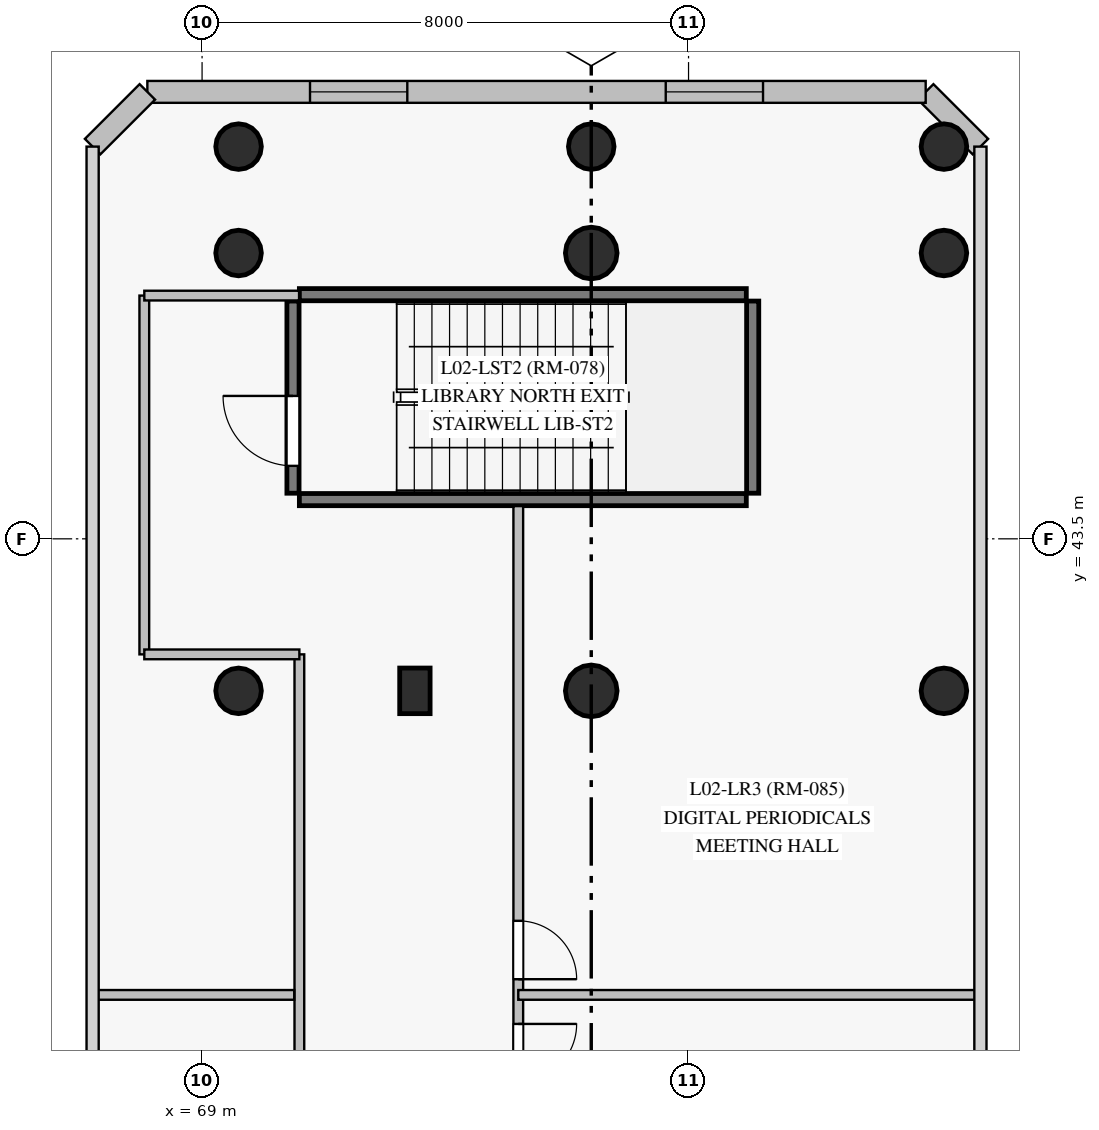
"""IFC4 building model, lengths in metres.
Left out: names, types, materials, properties, quantities, classifications, styles, units other than length and angle.
Written with IfcOpenShell. Run it as: python <this file> out.ifc"""

import sys

from ifc_helpers import new_model, si_unit, direction, frame, frame_2d, origin, origin_with_axes, origin_2d, place, context, subcontext, project, spatial, rectangle, circle, extrude, source, transform, mapped, element, fill, save


model = new_model("IFC4")
c1 = context("Model", 3, precision=1e-05, world=origin(), true_north=direction((0.0, 1.0)))
c2 = subcontext(c1, "Body", "Model", "MODEL_VIEW")
j1 = project(units=[si_unit("LENGTHUNIT", "METRE"), si_unit("PLANEANGLEUNIT", "RADIAN")], contexts=[c1])
p1 = place(None, origin())
s1 = spatial("IfcSite", under=j1, at=p1, CompositionType="ELEMENT")
p2 = place(p1, origin())
s2 = spatial("IfcBuilding", under=s1, at=p2, CompositionType="ELEMENT")
p3 = place(p2, frame((0.0, 0.0, 9.0)))
s3 = spatial("IfcBuildingStorey", under=s2, at=p3, CompositionType="ELEMENT", Elevation=9.0)
m1 = source(origin_with_axes(), c2, "Body", "SweptSolid", [
    extrude(circle(Radius=0.375, at=origin_2d()), origin(), (0.0, 0.0, 1.0), 4.5),
])
for number, where, z_axis, x_axis in (
    (1, (69.6, 49.95, 0.0), (0.0, 0.0, 1.0), (1.0, 0.0, 0.0)),
    (2, (75.4, 49.95, 0.0), (0.0, 0.0, 1.0), (1.0, 0.0, 0.0)),
    (3, (81.2, 49.95, 0.0), (0.0, 0.0, 1.0), (1.0, 0.0, 0.0)),
    (4, (69.6, 41.0, 0.0), (0.0, 0.0, 1.0), (1.0, 0.0, 0.0)),
    (5, (69.6, 48.2, 0.0), (0.0, 0.0, 1.0), (1.0, 0.0, 0.0)),
):
    element("IfcColumn", number, at=place(p3, frame(where, z_axis=z_axis, x_axis=x_axis)), inside=s3, PredefinedType="COLUMN", context=c2, shape_type="MappedRepresentation", body=[
        mapped(m1, transform((0.0, 0.0, 0.0), scale=1.0)),
    ])
m2 = source(origin_with_axes(), c2, "Body", "SweptSolid", [
    extrude(circle(Radius=0.425, at=origin_2d()), origin(), (0.0, 0.0, 1.0), 4.5),
])
for number, where, z_axis, x_axis in (
    (6, (75.4, 41.0, 0.0), (0.0, 0.0, 1.0), (1.0, 0.0, 0.0)),
    (7, (75.4, 48.2, 0.0), (0.0, 0.0, 1.0), (1.0, 0.0, 0.0)),
):
    element("IfcColumn", number, at=place(p3, frame(where, z_axis=z_axis, x_axis=x_axis)), inside=s3, PredefinedType="COLUMN", context=c2, shape_type="MappedRepresentation", body=[
        mapped(m2, transform((0.0, 0.0, 0.0), scale=1.0)),
    ])
for number, where, z_axis, x_axis in (
    (8, (81.2, 41.0, 0.0), (0.0, 0.0, 1.0), (1.0, 0.0, 0.0)),
    (9, (81.2, 48.2, 0.0), (0.0, 0.0, 1.0), (1.0, 0.0, 0.0)),
):
    element("IfcColumn", number, at=place(p3, frame(where, z_axis=z_axis, x_axis=x_axis)), inside=s3, PredefinedType="COLUMN", context=c2, shape_type="MappedRepresentation", body=[
        mapped(m1, transform((0.0, 0.0, 0.0), scale=1.0)),
    ])
m3 = source(origin_with_axes(), c2, "Body", "SweptSolid", [
    extrude(rectangle(XDim=0.5, YDim=0.75, at=origin_2d()), origin(), (0.0, 0.0, 1.0), 4.5),
])
p4 = place(p3, frame((72.5, 41.0, 0.0), z_axis=(0.0, 0.0, 1.0), x_axis=(1.0, 0.0, 0.0)))
e10 = element("IfcColumn", 10, at=p4, inside=s3, PredefinedType="PILASTER", context=c2, shape_type="MappedRepresentation", body=[
    mapped(m3, transform((0.0, 0.0, 0.0), scale=1.0)),
])
p5 = place(p3, frame((81.8, 49.95, 0.0), z_axis=(0.0, 0.0, 1.0), x_axis=(-0.707106781187, 0.707106781187, 0.0)))
e11 = element("IfcWall", 11, at=p5, inside=s3, PredefinedType="SOLIDWALL", context=c2, shape_type="SweptSolid", body=[
    extrude(rectangle(XDim=1.273, YDim=0.36, at=frame_2d((0.636, 0.0))), origin(), (0.0, 0.0, 1.0), 4.2),
])
p6 = place(p3, frame((80.9, 50.85, 0.0), z_axis=(0.0, 0.0, 1.0), x_axis=(-1.0, 0.0, 0.0)))
e12 = element("IfcWall", 12, at=p6, inside=s3, PredefinedType="SOLIDWALL", context=c2, shape_type="SweptSolid", body=[
    extrude(rectangle(XDim=12.8, YDim=0.36, at=frame_2d((6.4, 0.0))), origin(), (0.0, 0.0, 1.0), 4.2),
])
p7 = place(p6, frame((2.675, 0.0, 0.85)))
e13 = element("IfcOpeningElement", 13, at=p7, cuts=e12, PredefinedType="OPENING", context=c2, shape_type="SweptSolid", body=[
    extrude(rectangle(XDim=1.6, YDim=2.2, at=frame_2d((0.8, 1.1))), frame((0.0, 0.19, 0.0), z_axis=(0.0, -1.0, 0.0), x_axis=(1.0, 0.0, 0.0)), (0.0, 0.0, 1.0), 0.38),
])
p8 = place(p6, frame((8.525, 0.0, 0.85)))
e14 = element("IfcOpeningElement", 14, at=p8, cuts=e12, PredefinedType="OPENING", context=c2, shape_type="SweptSolid", body=[
    extrude(rectangle(XDim=1.6, YDim=2.2, at=frame_2d((0.8, 1.1))), frame((0.0, 0.19, 0.0), z_axis=(0.0, -1.0, 0.0), x_axis=(1.0, 0.0, 0.0)), (0.0, 0.0, 1.0), 0.38),
])
p9 = place(p3, frame((68.1, 50.85, 0.0), z_axis=(0.0, 0.0, 1.0), x_axis=(-0.707106781187, -0.707106781187, 0.0)))
e15 = element("IfcWall", 15, at=p9, inside=s3, PredefinedType="SOLIDWALL", context=c2, shape_type="SweptSolid", body=[
    extrude(rectangle(XDim=1.273, YDim=0.36, at=frame_2d((0.636, 0.0))), origin(), (0.0, 0.0, 1.0), 4.2),
])
for number, where, z_axis, x_axis in (
    (16, (70.6, 44.145, 0.0), (0.0, 0.0, 1.0), (1.0, 0.0, 0.0)),
    (17, (70.6, 47.515, 0.0), (0.0, 0.0, 1.0), (1.0, 0.0, 0.0)),
):
    element("IfcWall", number, at=place(p3, frame(where, z_axis=z_axis, x_axis=x_axis)), inside=s3, PredefinedType="SHEAR", context=c2, shape_type="SweptSolid", body=[
        extrude(rectangle(XDim=7.35, YDim=0.2, at=frame_2d((3.675, 0.0))), origin(), (0.0, 0.0, 1.0), 4.2),
    ])
p10 = place(p3, frame((70.495, 44.25, 0.0), z_axis=(0.0, 0.0, 1.0), x_axis=(0.0, 1.0, 0.0)))
e18 = element("IfcWall", 18, at=p10, inside=s3, PredefinedType="SHEAR", context=c2, shape_type="SweptSolid", body=[
    extrude(rectangle(XDim=3.16, YDim=0.2, at=frame_2d((1.58, 0.0))), origin(), (0.0, 0.0, 1.0), 4.2),
])
p11 = place(p10, frame((0.45, 0.0, 0.0)))
e19 = element("IfcOpeningElement", 19, at=p11, cuts=e18, PredefinedType="OPENING", context=c2, shape_type="SweptSolid", body=[
    extrude(rectangle(XDim=1.15, YDim=2.15, at=frame_2d((0.575, 1.075))), frame((0.0, 0.11, 0.0), z_axis=(0.0, -1.0, 0.0), x_axis=(1.0, 0.0, 0.0)), (0.0, 0.0, 1.0), 0.22),
])
p12 = place(p3, frame((78.055, 44.25, 0.0), z_axis=(0.0, 0.0, 1.0), x_axis=(0.0, 1.0, 0.0)))
e20 = element("IfcWall", 20, at=p12, inside=s3, PredefinedType="SHEAR", context=c2, shape_type="SweptSolid", body=[
    extrude(rectangle(XDim=3.16, YDim=0.2, at=frame_2d((1.58, 0.0))), origin(), (0.0, 0.0, 1.0), 4.2),
])
p13 = place(p3, frame((70.6, 11.4, 0.0), z_axis=(0.0, 0.0, 1.0), x_axis=(0.0, 1.0, 0.0)))
e21 = element("IfcWall", 21, at=p13, inside=s3, PredefinedType="PARTITIONING", context=c2, shape_type="SweptSolid", body=[
    extrude(rectangle(XDim=30.2, YDim=0.16, at=frame_2d((15.1, 0.0))), origin(), (0.0, 0.0, 1.0), 4.2),
])
p14 = place(p13, frame((6.135, 0.0, 0.0)))
e22 = element("IfcOpeningElement", 22, at=p14, cuts=e21, PredefinedType="OPENING", context=c2, shape_type="SweptSolid", body=[
    extrude(rectangle(XDim=0.96, YDim=2.15, at=frame_2d((0.48, 1.075))), frame((0.0, 0.09, 0.0), z_axis=(0.0, -1.0, 0.0), x_axis=(1.0, 0.0, 0.0)), (0.0, 0.0, 1.0), 0.18),
])
p15 = place(p3, frame((74.2, 44.038, 0.0), z_axis=(0.0, 0.0, 1.0), x_axis=(0.0, -1.0, 0.0)))
e23 = element("IfcWall", 23, at=p15, inside=s3, PredefinedType="PARTITIONING", context=c2, shape_type="SweptSolid", body=[
    extrude(rectangle(XDim=15.138, YDim=0.16, at=frame_2d((7.569, 0.0))), origin(), (0.0, 0.0, 1.0), 4.2),
])
p16 = place(p15, frame((8.515, 0.0, 0.0)))
e24 = element("IfcOpeningElement", 24, at=p16, cuts=e23, PredefinedType="OPENING", context=c2, shape_type="SweptSolid", body=[
    extrude(rectangle(XDim=0.96, YDim=2.15, at=frame_2d((0.48, 1.075))), frame((0.0, 0.09, 0.0), z_axis=(0.0, -1.0, 0.0), x_axis=(1.0, 0.0, 0.0)), (0.0, 0.0, 1.0), 0.18),
])
p17 = place(p15, frame((6.82, 0.0, 0.0)))
e25 = element("IfcOpeningElement", 25, at=p17, cuts=e23, PredefinedType="OPENING", context=c2, shape_type="SweptSolid", body=[
    extrude(rectangle(XDim=0.96, YDim=2.15, at=frame_2d((0.48, 1.075))), frame((0.0, 0.09, 0.0), z_axis=(0.0, -1.0, 0.0), x_axis=(1.0, 0.0, 0.0)), (0.0, 0.0, 1.0), 0.18),
])
p18 = place(p3, frame((74.2, 36.0, 0.0), z_axis=(0.0, 0.0, 1.0), x_axis=(1.0, 0.0, 0.0)))
e26 = element("IfcWall", 26, at=p18, inside=s3, PredefinedType="PARTITIONING", context=c2, shape_type="SweptSolid", body=[
    extrude(rectangle(XDim=7.545, YDim=0.16, at=frame_2d((3.772, 0.0))), origin(), (0.0, 0.0, 1.0), 4.2),
])
p19 = place(p3, frame((68.05, 41.6, 0.0), z_axis=(0.0, 0.0, 1.0), x_axis=(0.0, 1.0, 0.0)))
e27 = element("IfcWall", 27, at=p19, inside=s3, PredefinedType="PARTITIONING", context=c2, shape_type="SweptSolid", body=[
    extrude(rectangle(XDim=5.9, YDim=0.16, at=frame_2d((2.95, 0.0))), origin(), (0.0, 0.0, 1.0), 4.2),
])
p20 = place(p3, frame((67.255, 36.0, 0.0), z_axis=(0.0, 0.0, 1.0), x_axis=(1.0, 0.0, 0.0)))
e28 = element("IfcWall", 28, at=p20, inside=s3, PredefinedType="PARTITIONING", context=c2, shape_type="SweptSolid", body=[
    extrude(rectangle(XDim=3.26, YDim=0.16, at=frame_2d((1.63, 0.0))), origin(), (0.0, 0.0, 1.0), 4.2),
])
p21 = place(p3, frame((70.6, 41.6, 0.0), z_axis=(0.0, 0.0, 1.0), x_axis=(-1.0, 0.0, 0.0)))
e29 = element("IfcWall", 29, at=p21, inside=s3, PredefinedType="PARTITIONING", context=c2, shape_type="SweptSolid", body=[
    extrude(rectangle(XDim=2.55, YDim=0.16, at=frame_2d((1.275, 0.0))), origin(), (0.0, 0.0, 1.0), 3.55),
])
p22 = place(p3, frame((68.05, 47.5, 0.0), z_axis=(0.0, 0.0, 1.0), x_axis=(1.0, 0.0, 0.0)))
e30 = element("IfcWall", 30, at=p22, inside=s3, PredefinedType="PARTITIONING", context=c2, shape_type="SweptSolid", body=[
    extrude(rectangle(XDim=2.545, YDim=0.16, at=frame_2d((1.272, 0.0))), origin(), (0.0, 0.0, 1.0), 4.2),
])
m4 = source(origin_with_axes(), c2, "Body", "SweptSolid", [
    extrude(rectangle(XDim=1.6, YDim=2.2, at=frame_2d((0.8, 1.1))), frame((0.0, 0.03, 0.0), z_axis=(0.0, -1.0, 0.0), x_axis=(1.0, 0.0, 0.0)), (0.0, 0.0, 1.0), 0.06),
])
p23 = place(p7, origin())
e31 = element("IfcWindow", 31, at=p23, inside=s3, PartitioningType="SINGLE_PANEL", PredefinedType="WINDOW", context=c2, shape_type="MappedRepresentation", body=[
    mapped(m4, transform((0.0, 0.0, 0.0), scale=1.0)),
])
fill(e13, e31)
p24 = place(p8, origin())
e32 = element("IfcWindow", 32, at=p24, inside=s3, PartitioningType="SINGLE_PANEL", PredefinedType="WINDOW", context=c2, shape_type="MappedRepresentation", body=[
    mapped(m4, transform((0.0, 0.0, 0.0), scale=1.0)),
])
fill(e14, e32)
m5 = source(origin_with_axes(), c2, "Body", "SweptSolid", [
    extrude(rectangle(XDim=1.15, YDim=2.15, at=frame_2d((0.575, 1.075))), frame((0.0, 0.025, 0.0), z_axis=(0.0, -1.0, 0.0), x_axis=(1.0, 0.0, 0.0)), (0.0, 0.0, 1.0), 0.05),
])
p25 = place(p11, origin())
e33 = element("IfcDoor", 33, at=p25, inside=s3, OperationType="SINGLE_SWING_RIGHT", PredefinedType="DOOR", context=c2, shape_type="MappedRepresentation", body=[
    mapped(m5, transform((0.0, 0.0, 0.0), scale=1.0)),
])
fill(e19, e33)
m6 = source(origin_with_axes(), c2, "Body", "SweptSolid", [
    extrude(rectangle(XDim=0.96, YDim=2.15, at=frame_2d((0.48, 1.075))), frame((0.0, 0.025, 0.0), z_axis=(0.0, -1.0, 0.0), x_axis=(1.0, 0.0, 0.0)), (0.0, 0.0, 1.0), 0.05),
])
p26 = place(p16, origin())
e34 = element("IfcDoor", 34, at=p26, inside=s3, OperationType="SINGLE_SWING_LEFT", PredefinedType="DOOR", context=c2, shape_type="MappedRepresentation", body=[
    mapped(m6, transform((0.0, 0.0, 0.0), scale=1.0)),
])
fill(e24, e34)
p27 = place(p17, origin())
e35 = element("IfcDoor", 35, at=p27, inside=s3, OperationType="SINGLE_SWING_RIGHT", PredefinedType="DOOR", context=c2, shape_type="MappedRepresentation", body=[
    mapped(m6, transform((0.0, 0.0, 0.0), scale=1.0)),
])
fill(e25, e35)
save(model, sys.argv[1])
